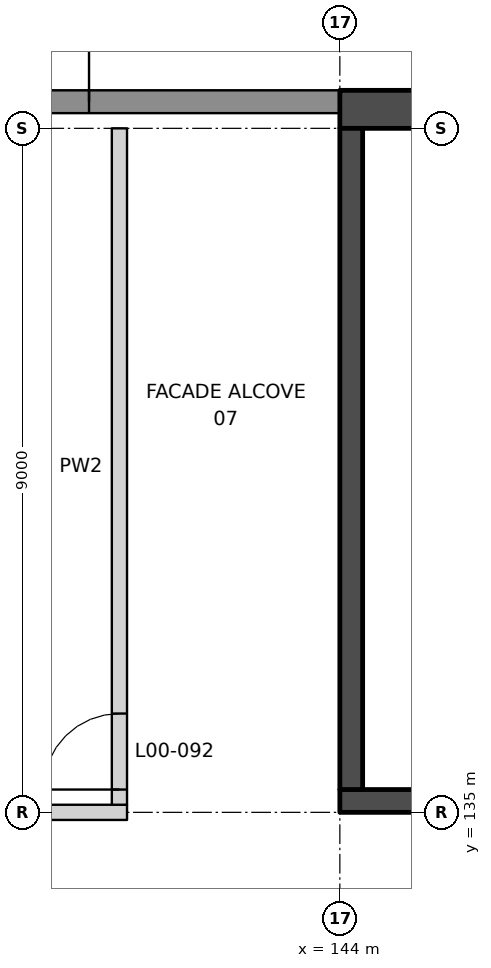
"""IFC4 building model, lengths in metres.
Left out: names, types, materials, properties, quantities, classifications, styles, units other than length and angle.
Written with IfcOpenShell. Run it as: python <this file> out.ifc"""

import sys

from ifc_helpers import new_model, si_unit, direction, frame, frame_2d, origin, place, context, subcontext, project, spatial, rectangle, extrude, element, fill, save


model = new_model("IFC4")
c1 = context("Model", 3, precision=1e-05, world=origin(), true_north=direction((0.0, 1.0)))
c2 = subcontext(c1, "Body", "Model", "MODEL_VIEW")
j1 = project(units=[si_unit("LENGTHUNIT", "METRE"), si_unit("PLANEANGLEUNIT", "RADIAN")], contexts=[c1])
p1 = place(None, origin())
s1 = spatial("IfcSite", under=j1, at=p1, CompositionType="ELEMENT")
p2 = place(p1, origin())
s2 = spatial("IfcBuilding", under=s1, at=p2, CompositionType="ELEMENT")
p3 = place(p2, origin())
s3 = spatial("IfcBuildingStorey", under=s2, at=p3, CompositionType="ELEMENT", Elevation=0.0)
p4 = place(p3, frame((135.45, 135.0, 0.0), z_axis=(0.0, 0.0, 1.0), x_axis=(1.0, 0.0, 0.0)))
e1 = element("IfcWall", 1, at=p4, inside=s3, PredefinedType="PARTITIONING", context=c2, shape_type="SweptSolid", body=[
    extrude(rectangle(XDim=5.75, YDim=0.2, at=frame_2d((2.875, 0.0))), origin(), (0.0, 0.0, 1.0), 5.75),
])
p5 = place(p3, frame((141.1, 135.1, 0.0), z_axis=(0.0, 0.0, 1.0), x_axis=(0.0, 1.0, 0.0)))
e2 = element("IfcWall", 2, at=p5, inside=s3, PredefinedType="PARTITIONING", context=c2, shape_type="SweptSolid", body=[
    extrude(rectangle(XDim=8.9, YDim=0.2, at=frame_2d((4.45, 0.0))), origin(), (0.0, 0.0, 1.0), 7.0),
])
p6 = place(p5, frame((0.2, 0.0, 0.0)))
e3 = element("IfcOpeningElement", 3, at=p6, cuts=e2, PredefinedType="OPENING", context=c2, shape_type="SweptSolid", body=[
    extrude(rectangle(XDim=1.0, YDim=2.1, at=frame_2d((0.5, 1.05))), frame((0.0, 0.11, 0.0), z_axis=(0.0, -1.0, 0.0), x_axis=(1.0, 0.0, 0.0)), (0.0, 0.0, 1.0), 0.22),
])
p7 = place(p3, frame((144.0, 144.35, 0.0), z_axis=(0.0, 0.0, 1.0), x_axis=(-1.0, 0.0, 0.0)))
e4 = element("IfcWall", 4, at=p7, inside=s3, PredefinedType="SOLIDWALL", context=c2, shape_type="SweptSolid", body=[
    extrude(rectangle(XDim=8.5, YDim=0.3, at=frame_2d((4.25, 0.0))), origin(), (0.0, 0.0, 1.0), 7.0),
])
p8 = place(p7, frame((3.3, 0.0, 0.0)))
e5 = element("IfcOpeningElement", 5, at=p8, cuts=e4, PredefinedType="OPENING", context=c2, shape_type="SweptSolid", body=[
    extrude(rectangle(XDim=2.4, YDim=2.4, at=frame_2d((1.2, 1.2))), frame((0.0, 0.16, 0.0), z_axis=(0.0, -1.0, 0.0), x_axis=(1.0, 0.0, 0.0)), (0.0, 0.0, 1.0), 0.32),
])
p9 = place(p3, frame((144.0, 135.15, 0.0), z_axis=(0.0, 0.0, 1.0), x_axis=(1.0, 0.0, 0.0)))
e6 = element("IfcWall", 6, at=p9, inside=s3, PredefinedType="SHEAR", context=c2, shape_type="SweptSolid", body=[
    extrude(rectangle(XDim=18.0, YDim=0.3, at=frame_2d((9.0, 0.0))), origin(), (0.0, 0.0, 1.0), 7.0),
])
p10 = place(p9, frame((8.6, 0.0, 0.0)))
e7 = element("IfcOpeningElement", 7, at=p10, cuts=e6, PredefinedType="OPENING", context=c2, shape_type="SweptSolid", body=[
    extrude(rectangle(XDim=1.2, YDim=2.1, at=frame_2d((0.6, 1.05))), frame((0.0, 0.16, 0.0), z_axis=(0.0, -1.0, 0.0), x_axis=(1.0, 0.0, 0.0)), (0.0, 0.0, 1.0), 0.32),
])
p11 = place(p3, frame((144.0, 144.25, 0.0), z_axis=(0.0, 0.0, 1.0), x_axis=(1.0, 0.0, 0.0)))
e8 = element("IfcWall", 8, at=p11, inside=s3, PredefinedType="SHEAR", context=c2, shape_type="SweptSolid", body=[
    extrude(rectangle(XDim=18.0, YDim=0.5, at=frame_2d((9.0, 0.0))), origin(), (0.0, 0.0, 1.0), 7.0),
])
p12 = place(p11, frame((7.9, 0.0, 0.0)))
e9 = element("IfcOpeningElement", 9, at=p12, cuts=e8, PredefinedType="OPENING", context=c2, shape_type="SweptSolid", body=[
    extrude(rectangle(XDim=2.6, YDim=2.4, at=frame_2d((1.3, 1.2))), frame((0.0, 0.26, 0.0), z_axis=(0.0, -1.0, 0.0), x_axis=(1.0, 0.0, 0.0)), (0.0, 0.0, 1.0), 0.52),
])
p13 = place(p3, frame((144.15, 135.3, 0.0), z_axis=(0.0, 0.0, 1.0), x_axis=(0.0, 1.0, 0.0)))
e10 = element("IfcWall", 10, at=p13, inside=s3, PredefinedType="SHEAR", context=c2, shape_type="SweptSolid", body=[
    extrude(rectangle(XDim=8.7, YDim=0.3, at=frame_2d((4.35, 0.0))), origin(), (0.0, 0.0, 1.0), 7.0),
])
p14 = place(p6, origin())
e11 = element("IfcDoor", 11, at=p14, inside=s3, OperationType="SINGLE_SWING_LEFT", PredefinedType="DOOR", context=c2, shape_type="SweptSolid", body=[
    extrude(rectangle(XDim=1.0, YDim=2.1, at=frame_2d((0.5, 1.05))), frame((0.0, 0.025, 0.0), z_axis=(0.0, -1.0, 0.0), x_axis=(1.0, 0.0, 0.0)), (0.0, 0.0, 1.0), 0.05),
])
fill(e3, e11)
p15 = place(p8, frame((2.4, 0.0, 0.0), z_axis=(0.0, 0.0, 1.0), x_axis=(-1.0, 0.0, 0.0)))
e12 = element("IfcDoor", 12, at=p15, inside=s3, OperationType="DOUBLE_DOOR_SINGLE_SWING", PredefinedType="DOOR", context=c2, shape_type="SweptSolid", body=[
    extrude(rectangle(XDim=2.4, YDim=2.4, at=frame_2d((1.2, 1.2))), frame((0.0, 0.025, 0.0), z_axis=(0.0, -1.0, 0.0), x_axis=(1.0, 0.0, 0.0)), (0.0, 0.0, 1.0), 0.05),
])
fill(e5, e12)
save(model, sys.argv[1])
